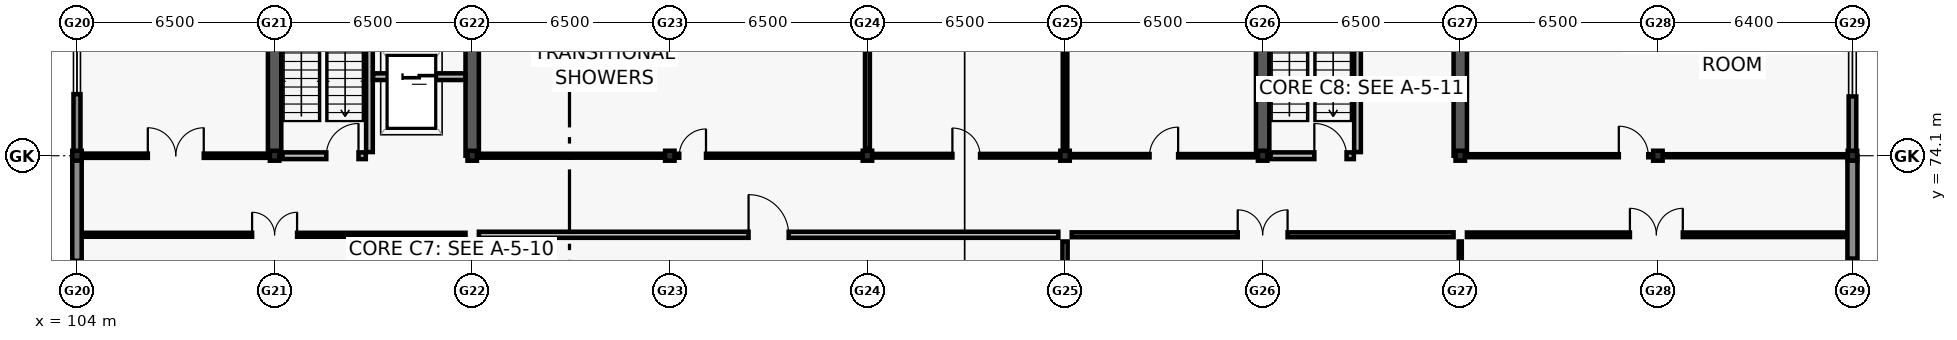
"""IFC4 building model, lengths in metres.
Left out: names, types, materials, properties, quantities, classifications, styles, units other than length and angle.
Written with IfcOpenShell. Run it as: python <this file> out.ifc"""

import sys

from ifc_helpers import new_model, si_unit, direction, frame, frame_2d, origin, origin_2d, place, context, subcontext, project, spatial, rectangle, i_section, extrude, element, fill, save


model = new_model("IFC4")
c1 = context("Model", 3, precision=1e-05, world=origin(), true_north=direction((0.0, 1.0)))
c2 = subcontext(c1, "Body", "Model", "MODEL_VIEW")
j1 = project(units=[si_unit("LENGTHUNIT", "METRE"), si_unit("PLANEANGLEUNIT", "RADIAN")], contexts=[c1])
p1 = place(None, origin())
s1 = spatial("IfcSite", under=j1, at=p1, CompositionType="ELEMENT")
p2 = place(p1, origin())
s2 = spatial("IfcBuilding", under=s1, at=p2, CompositionType="ELEMENT")
p3 = place(p2, origin())
s3 = spatial("IfcBuildingStorey", under=s2, at=p3, CompositionType="ELEMENT", Elevation=0.0)
for number, where, z_axis, x_axis in (
    (1, (104.0, 74.1, 0.0), (0.0, 0.0, 1.0), (1.0, 0.0, 0.0)),
    (2, (110.5, 74.1, 0.0), (0.0, 0.0, 1.0), (1.0, 0.0, 0.0)),
    (3, (117.0, 74.1, 0.0), (0.0, 0.0, 1.0), (1.0, 0.0, 0.0)),
    (4, (123.5, 74.1, 0.0), (0.0, 0.0, 1.0), (1.0, 0.0, 0.0)),
    (5, (130.0, 74.1, 0.0), (0.0, 0.0, 1.0), (1.0, 0.0, 0.0)),
    (6, (136.5, 74.1, 0.0), (0.0, 0.0, 1.0), (1.0, 0.0, 0.0)),
    (7, (143.0, 74.1, 0.0), (0.0, 0.0, 1.0), (1.0, 0.0, 0.0)),
    (8, (149.5, 74.1, 0.0), (0.0, 0.0, 1.0), (1.0, 0.0, 0.0)),
    (9, (156.0, 74.1, 0.0), (0.0, 0.0, 1.0), (1.0, 0.0, 0.0)),
    (10, (162.4, 74.1, 0.0), (0.0, 0.0, 1.0), (1.0, 0.0, 0.0)),
):
    element("IfcColumn", number, at=place(p3, frame(where, z_axis=z_axis, x_axis=x_axis)), inside=s3, PredefinedType="COLUMN", context=c2, shape_type="SweptSolid", body=[
        extrude(i_section(OverallWidth=0.311, OverallDepth=0.327, WebThickness=0.016, FlangeThickness=0.025, FilletRadius=0.017, at=origin_2d()), origin(), (0.0, 0.0, 1.0), 5.4),
    ])
for number, where, z_axis, x_axis in (
    (11, (110.5, 74.1, 0.0), (0.0, 0.0, 1.0), (0.0, 1.0, 0.0)),
    (12, (117.0, 74.1, 0.0), (0.0, 0.0, 1.0), (0.0, 1.0, 0.0)),
    (13, (143.0, 74.1, 0.0), (0.0, 0.0, 1.0), (0.0, 1.0, 0.0)),
    (14, (149.5, 74.1, 0.0), (0.0, 0.0, 1.0), (0.0, 1.0, 0.0)),
):
    element("IfcWall", number, at=place(p3, frame(where, z_axis=z_axis, x_axis=x_axis)), inside=s3, PredefinedType="SHEAR", context=c2, shape_type="SweptSolid", body=[
        extrude(rectangle(XDim=6.68, YDim=0.44, at=frame_2d((3.34, 0.0))), origin(), (0.0, 0.0, 1.0), 5.16),
    ])
p4 = place(p3, frame((104.0, 67.205, 0.0), z_axis=(0.0, 0.0, 1.0), x_axis=(0.0, 1.0, 0.0)))
e15 = element("IfcWall", 15, at=p4, inside=s3, PredefinedType="SOLIDWALL", context=c2, shape_type="SweptSolid", body=[
    extrude(rectangle(XDim=6.89, YDim=0.31, at=frame_2d((3.445, 0.0))), origin(), (0.0, 0.0, 1.0), 4.52),
])
p5 = place(p4, frame((0.887, 0.0, 0.8)))
e16 = element("IfcOpeningElement", 16, at=p5, cuts=e15, PredefinedType="OPENING", context=c2, shape_type="SweptSolid", body=[
    extrude(rectangle(XDim=2.55, YDim=2.1, at=frame_2d((1.275, 1.05))), frame((0.0, 0.165, 0.0), z_axis=(0.0, -1.0, 0.0), x_axis=(1.0, 0.0, 0.0)), (0.0, 0.0, 1.0), 0.33),
])
p6 = place(p3, frame((162.4, 74.095, 0.0), z_axis=(0.0, 0.0, 1.0), x_axis=(0.0, -1.0, 0.0)))
e17 = element("IfcWall", 17, at=p6, inside=s3, PredefinedType="SOLIDWALL", context=c2, shape_type="SweptSolid", body=[
    extrude(rectangle(XDim=6.89, YDim=0.33, at=frame_2d((3.445, 0.0))), origin(), (0.0, 0.0, 1.0), 4.52),
])
p7 = place(p6, frame((3.377, 0.0, 0.8)))
e18 = element("IfcOpeningElement", 18, at=p7, cuts=e17, PredefinedType="OPENING", context=c2, shape_type="SweptSolid", body=[
    extrude(rectangle(XDim=2.7, YDim=2.1, at=frame_2d((1.35, 1.05))), frame((0.0, 0.175, 0.0), z_axis=(0.0, -1.0, 0.0), x_axis=(1.0, 0.0, 0.0)), (0.0, 0.0, 1.0), 0.35),
])
p8 = place(p3, frame((104.0, 74.105, 0.0), z_axis=(0.0, 0.0, 1.0), x_axis=(0.0, 1.0, 0.0)))
e19 = element("IfcWall", 19, at=p8, inside=s3, PredefinedType="SOLIDWALL", context=c2, shape_type="SweptSolid", body=[
    extrude(rectangle(XDim=6.89, YDim=0.23, at=frame_2d((3.445, 0.0))), origin(), (0.0, 0.0, 1.0), 4.52),
])
p9 = place(p8, frame((2.02, 0.0, 0.8)))
e20 = element("IfcOpeningElement", 20, at=p9, cuts=e19, PredefinedType="OPENING", context=c2, shape_type="SweptSolid", body=[
    extrude(rectangle(XDim=2.85, YDim=2.1, at=frame_2d((1.425, 1.05))), frame((0.0, 0.125, 0.0), z_axis=(0.0, -1.0, 0.0), x_axis=(1.0, 0.0, 0.0)), (0.0, 0.0, 1.0), 0.25),
])
p10 = place(p3, frame((162.4, 80.995, 0.0), z_axis=(0.0, 0.0, 1.0), x_axis=(0.0, -1.0, 0.0)))
e21 = element("IfcWall", 21, at=p10, inside=s3, PredefinedType="SOLIDWALL", context=c2, shape_type="SweptSolid", body=[
    extrude(rectangle(XDim=6.89, YDim=0.25, at=frame_2d((3.445, 0.0))), origin(), (0.0, 0.0, 1.0), 4.52),
])
p11 = place(p10, frame((1.945, 0.0, 0.8)))
e22 = element("IfcOpeningElement", 22, at=p11, cuts=e21, PredefinedType="OPENING", context=c2, shape_type="SweptSolid", body=[
    extrude(rectangle(XDim=3.0, YDim=2.1, at=frame_2d((1.5, 1.05))), frame((0.0, 0.135, 0.0), z_axis=(0.0, -1.0, 0.0), x_axis=(1.0, 0.0, 0.0)), (0.0, 0.0, 1.0), 0.27),
])
p12 = place(p3, frame((113.62, 74.22, 0.0), z_axis=(0.0, 0.0, 1.0), x_axis=(0.0, 1.0, 0.0)))
e23 = element("IfcWall", 23, at=p12, inside=s3, PredefinedType="SOLIDWALL", context=c2, shape_type="SweptSolid", body=[
    extrude(rectangle(XDim=6.555, YDim=0.22, at=frame_2d((3.277, 0.0))), origin(), (0.0, 0.0, 1.0), 5.16),
])
p13 = place(p3, frame((110.76, 74.1, 0.0), z_axis=(0.0, 0.0, 1.0), x_axis=(1.0, 0.0, 0.0)))
e24 = element("IfcWall", 24, at=p13, inside=s3, PredefinedType="SOLIDWALL", context=c2, shape_type="SweptSolid", body=[
    extrude(rectangle(XDim=2.74, YDim=0.22, at=frame_2d((1.37, 0.0))), origin(), (0.0, 0.0, 1.0), 4.52),
])
p14 = place(p13, frame((1.44, 0.0, 0.0)))
e25 = element("IfcOpeningElement", 25, at=p14, cuts=e24, PredefinedType="OPENING", context=c2, shape_type="SweptSolid", body=[
    extrude(rectangle(XDim=1.06, YDim=2.1, at=frame_2d((0.53, 1.05))), frame((0.0, 0.12, 0.0), z_axis=(0.0, -1.0, 0.0), x_axis=(1.0, 0.0, 0.0)), (0.0, 0.0, 1.0), 0.24),
])
p15 = place(p3, frame((113.74, 76.7, 0.0), z_axis=(0.0, 0.0, 1.0), x_axis=(1.0, 0.0, 0.0)))
e26 = element("IfcWall", 26, at=p15, inside=s3, PredefinedType="SOLIDWALL", context=c2, shape_type="SweptSolid", body=[
    extrude(rectangle(XDim=3.035, YDim=0.22, at=frame_2d((1.518, 0.0))), origin(), (0.0, 0.0, 1.0), 5.16),
])
p16 = place(p15, frame((0.968, 0.0, 0.0)))
e27 = element("IfcOpeningElement", 27, at=p16, cuts=e26, PredefinedType="OPENING", context=c2, shape_type="SweptSolid", body=[
    extrude(rectangle(XDim=1.1, YDim=2.1, at=frame_2d((0.55, 1.05))), frame((0.0, 0.12, 0.0), z_axis=(0.0, -1.0, 0.0), x_axis=(1.0, 0.0, 0.0)), (0.0, 0.0, 1.0), 0.24),
])
p17 = place(p3, frame((146.12, 74.22, 0.0), z_axis=(0.0, 0.0, 1.0), x_axis=(0.0, 1.0, 0.0)))
e28 = element("IfcWall", 28, at=p17, inside=s3, PredefinedType="SOLIDWALL", context=c2, shape_type="SweptSolid", body=[
    extrude(rectangle(XDim=6.555, YDim=0.22, at=frame_2d((3.277, 0.0))), origin(), (0.0, 0.0, 1.0), 5.16),
])
p18 = place(p3, frame((143.26, 74.1, 0.0), z_axis=(0.0, 0.0, 1.0), x_axis=(1.0, 0.0, 0.0)))
e29 = element("IfcWall", 29, at=p18, inside=s3, PredefinedType="SOLIDWALL", context=c2, shape_type="SweptSolid", body=[
    extrude(rectangle(XDim=2.74, YDim=0.22, at=frame_2d((1.37, 0.0))), origin(), (0.0, 0.0, 1.0), 4.52),
])
p19 = place(p18, frame((1.44, 0.0, 0.0)))
e30 = element("IfcOpeningElement", 30, at=p19, cuts=e29, PredefinedType="OPENING", context=c2, shape_type="SweptSolid", body=[
    extrude(rectangle(XDim=1.06, YDim=2.1, at=frame_2d((0.53, 1.05))), frame((0.0, 0.12, 0.0), z_axis=(0.0, -1.0, 0.0), x_axis=(1.0, 0.0, 0.0)), (0.0, 0.0, 1.0), 0.24),
])
p20 = place(p3, frame((117.0, 60.52, 0.0), z_axis=(0.0, 0.0, 1.0), x_axis=(0.0, 1.0, 0.0)))
e31 = element("IfcWall", 31, at=p20, inside=s3, PredefinedType="PARTITIONING", context=c2, shape_type="SweptSolid", body=[
    extrude(rectangle(XDim=10.76, YDim=0.17, at=frame_2d((5.38, 0.0))), origin(), (0.0, 0.0, 1.0), 4.5),
])
p21 = place(p3, frame((104.22, 71.5, 0.0), z_axis=(0.0, 0.0, 1.0), x_axis=(1.0, 0.0, 0.0)))
e32 = element("IfcWall", 32, at=p21, inside=s3, PredefinedType="PARTITIONING", context=c2, shape_type="SweptSolid", body=[
    extrude(rectangle(XDim=12.56, YDim=0.13, at=frame_2d((6.28, 0.0))), origin(), (0.0, 0.0, 1.0), 4.5),
])
p22 = place(p21, frame((5.54, 0.0, 0.0)))
e33 = element("IfcOpeningElement", 33, at=p22, cuts=e32, PredefinedType="OPENING", context=c2, shape_type="SweptSolid", body=[
    extrude(rectangle(XDim=1.48, YDim=2.18, at=frame_2d((0.74, 1.09))), frame((0.0, 0.075, 0.0), z_axis=(0.0, -1.0, 0.0), x_axis=(1.0, 0.0, 0.0)), (0.0, 0.0, 1.0), 0.15),
])
p23 = place(p3, frame((136.5, 60.52, 0.0), z_axis=(0.0, 0.0, 1.0), x_axis=(0.0, 1.0, 0.0)))
e34 = element("IfcWall", 34, at=p23, inside=s3, PredefinedType="PARTITIONING", context=c2, shape_type="SweptSolid", body=[
    extrude(rectangle(XDim=10.76, YDim=0.17, at=frame_2d((5.38, 0.0))), origin(), (0.0, 0.0, 1.0), 4.5),
])
p24 = place(p3, frame((117.22, 71.5, 0.0), z_axis=(0.0, 0.0, 1.0), x_axis=(1.0, 0.0, 0.0)))
e35 = element("IfcWall", 35, at=p24, inside=s3, PredefinedType="PARTITIONING", context=c2, shape_type="SweptSolid", body=[
    extrude(rectangle(XDim=19.06, YDim=0.2, at=frame_2d((9.53, 0.0))), origin(), (0.0, 0.0, 1.0), 4.5),
])
p25 = place(p24, frame((8.87, 0.0, 0.0)))
e36 = element("IfcOpeningElement", 36, at=p25, cuts=e35, PredefinedType="OPENING", context=c2, shape_type="SweptSolid", body=[
    extrude(rectangle(XDim=1.32, YDim=2.12, at=frame_2d((0.66, 1.06))), frame((0.0, 0.11, 0.0), z_axis=(0.0, -1.0, 0.0), x_axis=(1.0, 0.0, 0.0)), (0.0, 0.0, 1.0), 0.22),
])
p26 = place(p3, frame((149.5, 60.52, 0.0), z_axis=(0.0, 0.0, 1.0), x_axis=(0.0, 1.0, 0.0)))
e37 = element("IfcWall", 37, at=p26, inside=s3, PredefinedType="PARTITIONING", context=c2, shape_type="SweptSolid", body=[
    extrude(rectangle(XDim=10.76, YDim=0.1, at=frame_2d((5.38, 0.0))), origin(), (0.0, 0.0, 1.0), 4.5),
])
p27 = place(p3, frame((136.72, 71.5, 0.0), z_axis=(0.0, 0.0, 1.0), x_axis=(1.0, 0.0, 0.0)))
e38 = element("IfcWall", 38, at=p27, inside=s3, PredefinedType="PARTITIONING", context=c2, shape_type="SweptSolid", body=[
    extrude(rectangle(XDim=12.56, YDim=0.16, at=frame_2d((6.28, 0.0))), origin(), (0.0, 0.0, 1.0), 4.5),
])
p28 = place(p27, frame((5.46, 0.0, 0.0)))
e39 = element("IfcOpeningElement", 39, at=p28, cuts=e38, PredefinedType="OPENING", context=c2, shape_type="SweptSolid", body=[
    extrude(rectangle(XDim=1.64, YDim=2.2, at=frame_2d((0.82, 1.1))), frame((0.0, 0.09, 0.0), z_axis=(0.0, -1.0, 0.0), x_axis=(1.0, 0.0, 0.0)), (0.0, 0.0, 1.0), 0.18),
])
p29 = place(p3, frame((149.72, 71.5, 0.0), z_axis=(0.0, 0.0, 1.0), x_axis=(1.0, 0.0, 0.0)))
e40 = element("IfcWall", 40, at=p29, inside=s3, PredefinedType="PARTITIONING", context=c2, shape_type="SweptSolid", body=[
    extrude(rectangle(XDim=12.46, YDim=0.15, at=frame_2d((6.23, 0.0))), origin(), (0.0, 0.0, 1.0), 4.5),
])
p30 = place(p29, frame((5.36, 0.0, 0.0)))
e41 = element("IfcOpeningElement", 41, at=p30, cuts=e40, PredefinedType="OPENING", context=c2, shape_type="SweptSolid", body=[
    extrude(rectangle(XDim=1.74, YDim=2.2, at=frame_2d((0.87, 1.1))), frame((0.0, 0.085, 0.0), z_axis=(0.0, -1.0, 0.0), x_axis=(1.0, 0.0, 0.0)), (0.0, 0.0, 1.0), 0.17),
])
p31 = place(p3, frame((104.22, 74.1, 0.0), z_axis=(0.0, 0.0, 1.0), x_axis=(1.0, 0.0, 0.0)))
e42 = element("IfcWall", 42, at=p31, inside=s3, PredefinedType="PARTITIONING", context=c2, shape_type="SweptSolid", body=[
    extrude(rectangle(XDim=6.06, YDim=0.14, at=frame_2d((3.03, 0.0))), origin(), (0.0, 0.0, 1.0), 4.5),
])
p32 = place(p31, frame((2.11, 0.0, 0.0)))
e43 = element("IfcOpeningElement", 43, at=p32, cuts=e42, PredefinedType="OPENING", context=c2, shape_type="SweptSolid", body=[
    extrude(rectangle(XDim=1.84, YDim=2.22, at=frame_2d((0.92, 1.11))), frame((0.0, 0.08, 0.0), z_axis=(0.0, -1.0, 0.0), x_axis=(1.0, 0.0, 0.0)), (0.0, 0.0, 1.0), 0.16),
])
p33 = place(p3, frame((117.22, 74.1, 0.0), z_axis=(0.0, 0.0, 1.0), x_axis=(1.0, 0.0, 0.0)))
e44 = element("IfcWall", 44, at=p33, inside=s3, PredefinedType="PARTITIONING", context=c2, shape_type="SweptSolid", body=[
    extrude(rectangle(XDim=12.56, YDim=0.13, at=frame_2d((6.28, 0.0))), origin(), (0.0, 0.0, 1.0), 4.5),
])
p34 = place(p33, frame((6.59, 0.0, 0.0)))
e45 = element("IfcOpeningElement", 45, at=p34, cuts=e44, PredefinedType="OPENING", context=c2, shape_type="SweptSolid", body=[
    extrude(rectangle(XDim=0.88, YDim=2.04, at=frame_2d((0.44, 1.02))), frame((0.0, 0.075, 0.0), z_axis=(0.0, -1.0, 0.0), x_axis=(1.0, 0.0, 0.0)), (0.0, 0.0, 1.0), 0.15),
])
p35 = place(p3, frame((130.22, 74.1, 0.0), z_axis=(0.0, 0.0, 1.0), x_axis=(1.0, 0.0, 0.0)))
e46 = element("IfcWall", 46, at=p35, inside=s3, PredefinedType="PARTITIONING", context=c2, shape_type="SweptSolid", body=[
    extrude(rectangle(XDim=6.06, YDim=0.12, at=frame_2d((3.03, 0.0))), origin(), (0.0, 0.0, 1.0), 4.5),
])
p36 = place(p35, frame((2.575, 0.0, 0.0)))
e47 = element("IfcOpeningElement", 47, at=p36, cuts=e46, PredefinedType="OPENING", context=c2, shape_type="SweptSolid", body=[
    extrude(rectangle(XDim=0.91, YDim=2.06, at=frame_2d((0.455, 1.03))), frame((0.0, 0.07, 0.0), z_axis=(0.0, -1.0, 0.0), x_axis=(1.0, 0.0, 0.0)), (0.0, 0.0, 1.0), 0.14),
])
p37 = place(p3, frame((136.72, 74.1, 0.0), z_axis=(0.0, 0.0, 1.0), x_axis=(1.0, 0.0, 0.0)))
e48 = element("IfcWall", 48, at=p37, inside=s3, PredefinedType="PARTITIONING", context=c2, shape_type="SweptSolid", body=[
    extrude(rectangle(XDim=6.06, YDim=0.11, at=frame_2d((3.03, 0.0))), origin(), (0.0, 0.0, 1.0), 4.5),
])
p38 = place(p37, frame((2.56, 0.0, 0.0)))
e49 = element("IfcOpeningElement", 49, at=p38, cuts=e48, PredefinedType="OPENING", context=c2, shape_type="SweptSolid", body=[
    extrude(rectangle(XDim=0.94, YDim=2.08, at=frame_2d((0.47, 1.04))), frame((0.0, 0.065, 0.0), z_axis=(0.0, -1.0, 0.0), x_axis=(1.0, 0.0, 0.0)), (0.0, 0.0, 1.0), 0.13),
])
p39 = place(p3, frame((149.72, 74.1, 0.0), z_axis=(0.0, 0.0, 1.0), x_axis=(1.0, 0.0, 0.0)))
e50 = element("IfcWall", 50, at=p39, inside=s3, PredefinedType="PARTITIONING", context=c2, shape_type="SweptSolid", body=[
    extrude(rectangle(XDim=12.46, YDim=0.1, at=frame_2d((6.23, 0.0))), origin(), (0.0, 0.0, 1.0), 4.5),
])
p40 = place(p39, frame((4.995, 0.0, 0.0)))
e51 = element("IfcOpeningElement", 51, at=p40, cuts=e50, PredefinedType="OPENING", context=c2, shape_type="SweptSolid", body=[
    extrude(rectangle(XDim=0.97, YDim=2.1, at=frame_2d((0.485, 1.05))), frame((0.0, 0.06, 0.0), z_axis=(0.0, -1.0, 0.0), x_axis=(1.0, 0.0, 0.0)), (0.0, 0.0, 1.0), 0.12),
])
p41 = place(p3, frame((130.0, 74.32, 0.0), z_axis=(0.0, 0.0, 1.0), x_axis=(0.0, 1.0, 0.0)))
e52 = element("IfcWall", 52, at=p41, inside=s3, PredefinedType="PARTITIONING", context=c2, shape_type="SweptSolid", body=[
    extrude(rectangle(XDim=6.46, YDim=0.16, at=frame_2d((3.23, 0.0))), origin(), (0.0, 0.0, 1.0), 4.5),
])
p42 = place(p3, frame((136.5, 74.32, 0.0), z_axis=(0.0, 0.0, 1.0), x_axis=(0.0, 1.0, 0.0)))
e53 = element("IfcWall", 53, at=p42, inside=s3, PredefinedType="PARTITIONING", context=c2, shape_type="SweptSolid", body=[
    extrude(rectangle(XDim=6.46, YDim=0.15, at=frame_2d((3.23, 0.0))), origin(), (0.0, 0.0, 1.0), 4.5),
])
p43 = place(p7, origin())
e54 = element("IfcWindow", 54, at=p43, inside=s3, PartitioningType="TRIPLE_PANEL_VERTICAL", PredefinedType="WINDOW", context=c2, shape_type="SweptSolid", body=[
    extrude(rectangle(XDim=2.7, YDim=2.1, at=frame_2d((1.35, 1.05))), frame((0.0, 0.03, 0.0), z_axis=(0.0, -1.0, 0.0), x_axis=(1.0, 0.0, 0.0)), (0.0, 0.0, 1.0), 0.06),
])
fill(e18, e54)
p44 = place(p9, origin())
e55 = element("IfcWindow", 55, at=p44, inside=s3, PartitioningType="TRIPLE_PANEL_VERTICAL", PredefinedType="WINDOW", context=c2, shape_type="SweptSolid", body=[
    extrude(rectangle(XDim=2.85, YDim=2.1, at=frame_2d((1.425, 1.05))), frame((0.0, 0.03, 0.0), z_axis=(0.0, -1.0, 0.0), x_axis=(1.0, 0.0, 0.0)), (0.0, 0.0, 1.0), 0.06),
])
fill(e20, e55)
p45 = place(p11, origin())
e56 = element("IfcWindow", 56, at=p45, inside=s3, PartitioningType="TRIPLE_PANEL_VERTICAL", PredefinedType="WINDOW", context=c2, shape_type="SweptSolid", body=[
    extrude(rectangle(XDim=3.0, YDim=2.1, at=frame_2d((1.5, 1.05))), frame((0.0, 0.03, 0.0), z_axis=(0.0, -1.0, 0.0), x_axis=(1.0, 0.0, 0.0)), (0.0, 0.0, 1.0), 0.06),
])
fill(e22, e56)
p46 = place(p14, origin())
e57 = element("IfcDoor", 57, at=p46, inside=s3, OperationType="SINGLE_SWING_RIGHT", PredefinedType="DOOR", context=c2, shape_type="SweptSolid", body=[
    extrude(rectangle(XDim=1.06, YDim=2.1, at=frame_2d((0.53, 1.05))), frame((0.0, 0.025, 0.0), z_axis=(0.0, -1.0, 0.0), x_axis=(1.0, 0.0, 0.0)), (0.0, 0.0, 1.0), 0.05),
])
fill(e25, e57)
p47 = place(p16, origin())
e58 = element("IfcDoor", 58, at=p47, inside=s3, OperationType="DOUBLE_DOOR_SLIDING", PredefinedType="DOOR", context=c2, shape_type="SweptSolid", body=[
    extrude(rectangle(XDim=1.1, YDim=2.1, at=frame_2d((0.55, 1.05))), frame((0.0, 0.025, 0.0), z_axis=(0.0, -1.0, 0.0), x_axis=(1.0, 0.0, 0.0)), (0.0, 0.0, 1.0), 0.05),
])
fill(e27, e58)
p48 = place(p19, origin())
e59 = element("IfcDoor", 59, at=p48, inside=s3, OperationType="SINGLE_SWING_LEFT", PredefinedType="DOOR", context=c2, shape_type="SweptSolid", body=[
    extrude(rectangle(XDim=1.06, YDim=2.1, at=frame_2d((0.53, 1.05))), frame((0.0, 0.025, 0.0), z_axis=(0.0, -1.0, 0.0), x_axis=(1.0, 0.0, 0.0)), (0.0, 0.0, 1.0), 0.05),
])
fill(e30, e59)
p49 = place(p22, origin())
e60 = element("IfcDoor", 60, at=p49, inside=s3, OperationType="DOUBLE_DOOR_SINGLE_SWING", PredefinedType="DOOR", context=c2, shape_type="SweptSolid", body=[
    extrude(rectangle(XDim=1.48, YDim=2.18, at=frame_2d((0.74, 1.09))), frame((0.0, 0.025, 0.0), z_axis=(0.0, -1.0, 0.0), x_axis=(1.0, 0.0, 0.0)), (0.0, 0.0, 1.0), 0.05),
])
fill(e33, e60)
p50 = place(p25, origin())
e61 = element("IfcDoor", 61, at=p50, inside=s3, OperationType="SINGLE_SWING_LEFT", PredefinedType="DOOR", context=c2, shape_type="SweptSolid", body=[
    extrude(rectangle(XDim=1.32, YDim=2.12, at=frame_2d((0.66, 1.06))), frame((0.0, 0.025, 0.0), z_axis=(0.0, -1.0, 0.0), x_axis=(1.0, 0.0, 0.0)), (0.0, 0.0, 1.0), 0.05),
])
fill(e36, e61)
p51 = place(p28, origin())
e62 = element("IfcDoor", 62, at=p51, inside=s3, OperationType="DOUBLE_DOOR_SINGLE_SWING", PredefinedType="DOOR", context=c2, shape_type="SweptSolid", body=[
    extrude(rectangle(XDim=1.64, YDim=2.2, at=frame_2d((0.82, 1.1))), frame((0.0, 0.025, 0.0), z_axis=(0.0, -1.0, 0.0), x_axis=(1.0, 0.0, 0.0)), (0.0, 0.0, 1.0), 0.05),
])
fill(e39, e62)
p52 = place(p30, origin())
e63 = element("IfcDoor", 63, at=p52, inside=s3, OperationType="DOUBLE_DOOR_SINGLE_SWING", PredefinedType="DOOR", context=c2, shape_type="SweptSolid", body=[
    extrude(rectangle(XDim=1.74, YDim=2.2, at=frame_2d((0.87, 1.1))), frame((0.0, 0.025, 0.0), z_axis=(0.0, -1.0, 0.0), x_axis=(1.0, 0.0, 0.0)), (0.0, 0.0, 1.0), 0.05),
])
fill(e41, e63)
p53 = place(p32, origin())
e64 = element("IfcDoor", 64, at=p53, inside=s3, OperationType="DOUBLE_DOOR_SINGLE_SWING", PredefinedType="DOOR", context=c2, shape_type="SweptSolid", body=[
    extrude(rectangle(XDim=1.84, YDim=2.22, at=frame_2d((0.92, 1.11))), frame((0.0, 0.025, 0.0), z_axis=(0.0, -1.0, 0.0), x_axis=(1.0, 0.0, 0.0)), (0.0, 0.0, 1.0), 0.05),
])
fill(e43, e64)
p54 = place(p34, origin())
e65 = element("IfcDoor", 65, at=p54, inside=s3, OperationType="SINGLE_SWING_RIGHT", PredefinedType="DOOR", context=c2, shape_type="SweptSolid", body=[
    extrude(rectangle(XDim=0.88, YDim=2.04, at=frame_2d((0.44, 1.02))), frame((0.0, 0.025, 0.0), z_axis=(0.0, -1.0, 0.0), x_axis=(1.0, 0.0, 0.0)), (0.0, 0.0, 1.0), 0.05),
])
fill(e45, e65)
p55 = place(p36, origin())
e66 = element("IfcDoor", 66, at=p55, inside=s3, OperationType="SINGLE_SWING_LEFT", PredefinedType="DOOR", context=c2, shape_type="SweptSolid", body=[
    extrude(rectangle(XDim=0.91, YDim=2.06, at=frame_2d((0.455, 1.03))), frame((0.0, 0.025, 0.0), z_axis=(0.0, -1.0, 0.0), x_axis=(1.0, 0.0, 0.0)), (0.0, 0.0, 1.0), 0.05),
])
fill(e47, e66)
p56 = place(p38, origin())
e67 = element("IfcDoor", 67, at=p56, inside=s3, OperationType="SINGLE_SWING_RIGHT", PredefinedType="DOOR", context=c2, shape_type="SweptSolid", body=[
    extrude(rectangle(XDim=0.94, YDim=2.08, at=frame_2d((0.47, 1.04))), frame((0.0, 0.025, 0.0), z_axis=(0.0, -1.0, 0.0), x_axis=(1.0, 0.0, 0.0)), (0.0, 0.0, 1.0), 0.05),
])
fill(e49, e67)
p57 = place(p40, origin())
e68 = element("IfcDoor", 68, at=p57, inside=s3, OperationType="SINGLE_SWING_LEFT", PredefinedType="DOOR", context=c2, shape_type="SweptSolid", body=[
    extrude(rectangle(XDim=0.97, YDim=2.1, at=frame_2d((0.485, 1.05))), frame((0.0, 0.025, 0.0), z_axis=(0.0, -1.0, 0.0), x_axis=(1.0, 0.0, 0.0)), (0.0, 0.0, 1.0), 0.05),
])
fill(e51, e68)
save(model, sys.argv[1])
